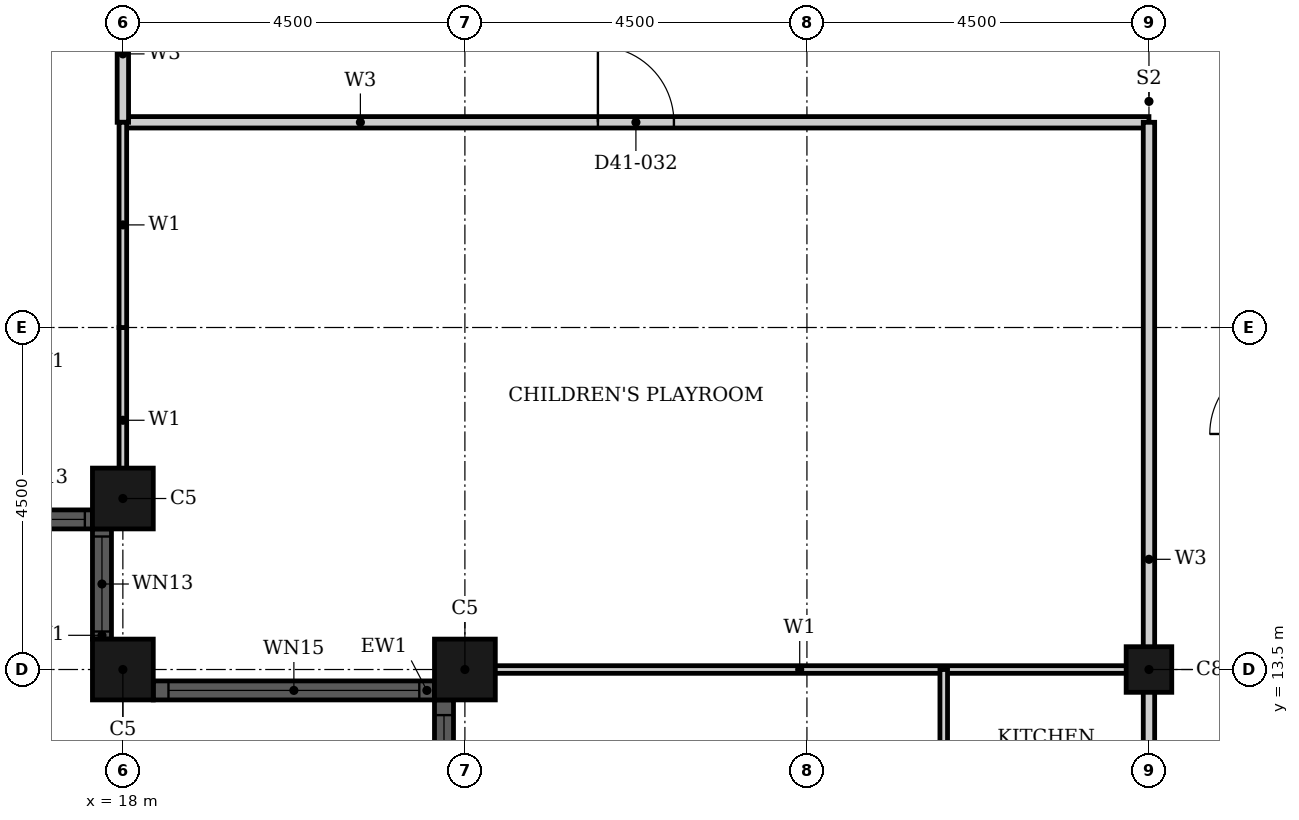
"""IFC4 building model, lengths in metres.
Left out: names, types, materials, properties, quantities, classifications, styles, units other than length and angle.
Written with IfcOpenShell. Run it as: python <this file> out.ifc"""

import sys

from ifc_helpers import new_model, si_unit, direction, frame, frame_2d, origin, origin_2d, place, context, subcontext, project, spatial, rectangle, hollow_rectangle, extrude, element, fill, save


model = new_model("IFC4")
c1 = context("Model", 3, precision=1e-05, world=origin(), true_north=direction((0.0, 1.0)))
c2 = subcontext(c1, "Body", "Model", "MODEL_VIEW")
j1 = project(units=[si_unit("LENGTHUNIT", "METRE"), si_unit("PLANEANGLEUNIT", "RADIAN")], contexts=[c1])
p1 = place(None, origin())
s1 = spatial("IfcSite", under=j1, at=p1, CompositionType="ELEMENT")
p2 = place(p1, origin())
s2 = spatial("IfcBuilding", under=s1, at=p2, CompositionType="ELEMENT")
p3 = place(p2, frame((0.0, 0.0, 165.4)))
s3 = spatial("IfcBuildingStorey", under=s2, at=p3, CompositionType="ELEMENT", Elevation=165.4)
for number, where, z_axis, x_axis in (
    (1, (18.0, 15.75, 0.0), (0.0, 0.0, 1.0), (1.0, 0.0, 0.0)),
    (2, (18.0, 13.5, 0.0), (0.0, 0.0, 1.0), (1.0, 0.0, 0.0)),
    (3, (22.5, 13.5, 0.0), (0.0, 0.0, 1.0), (1.0, 0.0, 0.0)),
):
    element("IfcColumn", number, at=place(p3, frame(where, z_axis=z_axis, x_axis=x_axis)), inside=s3, PredefinedType="COLUMN", context=c2, shape_type="SweptSolid", body=[
        extrude(hollow_rectangle(XDim=0.8, YDim=0.8, WallThickness=0.025, at=origin_2d()), origin(), (0.0, 0.0, 1.0), 3.7),
    ])
p4 = place(p3, frame((31.5, 13.5, 0.0), z_axis=(0.0, 0.0, 1.0), x_axis=(1.0, 0.0, 0.0)))
e4 = element("IfcColumn", 4, at=p4, inside=s3, PredefinedType="COLUMN", context=c2, shape_type="SweptSolid", body=[
    extrude(hollow_rectangle(XDim=0.6, YDim=0.6, WallThickness=0.02, at=origin_2d()), origin(), (0.0, 0.0, 1.0), 3.7),
])
p5 = place(p3, frame((16.15, 15.475, 0.0), z_axis=(0.0, 0.0, 1.0), x_axis=(1.0, 0.0, 0.0)))
e5 = element("IfcWall", 5, at=p5, inside=s3, PredefinedType="SOLIDWALL", context=c2, shape_type="SweptSolid", body=[
    extrude(rectangle(XDim=1.45, YDim=0.25, at=frame_2d((0.725, 0.0))), origin(), (0.0, 0.0, 1.0), 3.7),
])
p6 = place(p5, frame((0.1, 0.0, 0.9)))
e6 = element("IfcOpeningElement", 6, at=p6, cuts=e5, PredefinedType="OPENING", context=c2, shape_type="SweptSolid", body=[
    extrude(rectangle(XDim=1.25, YDim=1.85, at=frame_2d((0.625, 0.925))), frame((0.0, 0.135, 0.0), z_axis=(0.0, -1.0, 0.0), x_axis=(1.0, 0.0, 0.0)), (0.0, 0.0, 1.0), 0.27),
])
p7 = place(p3, frame((17.725, 15.35, 0.0), z_axis=(0.0, 0.0, 1.0), x_axis=(0.0, -1.0, 0.0)))
e7 = element("IfcWall", 7, at=p7, inside=s3, PredefinedType="SOLIDWALL", context=c2, shape_type="SweptSolid", body=[
    extrude(rectangle(XDim=1.45, YDim=0.25, at=frame_2d((0.725, 0.0))), origin(), (0.0, 0.0, 1.0), 3.7),
])
p8 = place(p7, frame((0.1, 0.0, 0.9)))
e8 = element("IfcOpeningElement", 8, at=p8, cuts=e7, PredefinedType="OPENING", context=c2, shape_type="SweptSolid", body=[
    extrude(rectangle(XDim=1.25, YDim=1.85, at=frame_2d((0.625, 0.925))), frame((0.0, 0.135, 0.0), z_axis=(0.0, -1.0, 0.0), x_axis=(1.0, 0.0, 0.0)), (0.0, 0.0, 1.0), 0.27),
])
p9 = place(p3, frame((18.4, 13.225, 0.0), z_axis=(0.0, 0.0, 1.0), x_axis=(1.0, 0.0, 0.0)))
e9 = element("IfcWall", 9, at=p9, inside=s3, PredefinedType="SOLIDWALL", context=c2, shape_type="SweptSolid", body=[
    extrude(rectangle(XDim=3.7, YDim=0.25, at=frame_2d((1.85, 0.0))), origin(), (0.0, 0.0, 1.0), 3.7),
])
p10 = place(p9, frame((0.2, 0.0, 0.45)))
e10 = element("IfcOpeningElement", 10, at=p10, cuts=e9, PredefinedType="OPENING", context=c2, shape_type="SweptSolid", body=[
    extrude(rectangle(XDim=3.3, YDim=2.3, at=frame_2d((1.65, 1.15))), frame((0.0, 0.135, 0.0), z_axis=(0.0, -1.0, 0.0), x_axis=(1.0, 0.0, 0.0)), (0.0, 0.0, 1.0), 0.27),
])
p11 = place(p3, frame((22.225, 13.1, 0.0), z_axis=(0.0, 0.0, 1.0), x_axis=(0.0, -1.0, 0.0)))
e11 = element("IfcWall", 11, at=p11, inside=s3, PredefinedType="SOLIDWALL", context=c2, shape_type="SweptSolid", body=[
    extrude(rectangle(XDim=8.2, YDim=0.25, at=frame_2d((4.1, 0.0))), origin(), (0.0, 0.0, 1.0), 3.7),
])
p12 = place(p11, frame((0.2, 0.0, 0.45)))
e12 = element("IfcOpeningElement", 12, at=p12, cuts=e11, PredefinedType="OPENING", context=c2, shape_type="SweptSolid", body=[
    extrude(rectangle(XDim=3.3, YDim=2.3, at=frame_2d((1.65, 1.15))), frame((0.0, 0.135, 0.0), z_axis=(0.0, -1.0, 0.0), x_axis=(1.0, 0.0, 0.0)), (0.0, 0.0, 1.0), 0.27),
])
p13 = place(p11, frame((4.7, 0.0, 0.45)))
e13 = element("IfcOpeningElement", 13, at=p13, cuts=e11, PredefinedType="OPENING", context=c2, shape_type="SweptSolid", body=[
    extrude(rectangle(XDim=3.3, YDim=2.3, at=frame_2d((1.65, 1.15))), frame((0.0, 0.135, 0.0), z_axis=(0.0, -1.0, 0.0), x_axis=(1.0, 0.0, 0.0)), (0.0, 0.0, 1.0), 0.27),
])
p14 = place(p3, frame((18.0, 20.7, 0.0), z_axis=(0.0, 0.0, 1.0), x_axis=(1.0, 0.0, 0.0)))
e14 = element("IfcWall", 14, at=p14, inside=s3, PredefinedType="PARTITIONING", context=c2, shape_type="SweptSolid", body=[
    extrude(rectangle(XDim=13.5, YDim=0.15, at=frame_2d((6.75, 0.0))), origin(), (0.0, 0.0, 1.0), 3.4),
])
p15 = place(p14, frame((6.25, 0.0, 0.0)))
e15 = element("IfcOpeningElement", 15, at=p15, cuts=e14, PredefinedType="OPENING", context=c2, shape_type="SweptSolid", body=[
    extrude(rectangle(XDim=1.0, YDim=2.1, at=frame_2d((0.5, 1.05))), frame((0.0, 0.085, 0.0), z_axis=(0.0, -1.0, 0.0), x_axis=(1.0, 0.0, 0.0)), (0.0, 0.0, 1.0), 0.17),
])
p16 = place(p3, frame((18.0, 20.7, 0.0), z_axis=(0.0, 0.0, 1.0), x_axis=(0.0, 1.0, 0.0)))
e16 = element("IfcWall", 16, at=p16, inside=s3, PredefinedType="PARTITIONING", context=c2, shape_type="SweptSolid", body=[
    extrude(rectangle(XDim=1.8, YDim=0.15, at=frame_2d((0.9, 0.0))), origin(), (0.0, 0.0, 1.0), 3.4),
])
p17 = place(p3, frame((31.5, 6.9, 0.0), z_axis=(0.0, 0.0, 1.0), x_axis=(0.0, 1.0, 0.0)))
e17 = element("IfcWall", 17, at=p17, inside=s3, PredefinedType="PARTITIONING", context=c2, shape_type="SweptSolid", body=[
    extrude(rectangle(XDim=13.8, YDim=0.15, at=frame_2d((6.9, 0.0))), origin(), (0.0, 0.0, 1.0), 2.68),
])
p18 = place(p17, frame((1.3, 0.0, 0.0)))
e18 = element("IfcOpeningElement", 18, at=p18, cuts=e17, PredefinedType="OPENING", context=c2, shape_type="SweptSolid", body=[
    extrude(rectangle(XDim=1.0, YDim=2.2, at=frame_2d((0.5, 1.1))), frame((0.0, 0.085, 0.0), z_axis=(0.0, -1.0, 0.0), x_axis=(1.0, 0.0, 0.0)), (0.0, 0.0, 1.0), 0.17),
])
p19 = place(p3, frame((22.31, 13.5, 0.0), z_axis=(0.0, 0.0, 1.0), x_axis=(1.0, 0.0, 0.0)))
e19 = element("IfcWall", 19, at=p19, inside=s3, PredefinedType="PARTITIONING", context=c2, shape_type="SweptSolid", body=[
    extrude(rectangle(XDim=9.19, YDim=0.1, at=frame_2d((4.595, 0.0))), origin(), (0.0, 0.0, 1.0), 2.48),
])
p20 = place(p3, frame((18.0, 15.56, 0.0), z_axis=(0.0, 0.0, 1.0), x_axis=(0.0, 1.0, 0.0)))
e20 = element("IfcWall", 20, at=p20, inside=s3, PredefinedType="PARTITIONING", context=c2, shape_type="SweptSolid", body=[
    extrude(rectangle(XDim=2.439, YDim=0.1, at=frame_2d((1.219, 0.0))), origin(), (0.0, 0.0, 1.0), 3.4),
])
p21 = place(p3, frame((18.0, 18.0, 0.0), z_axis=(0.0, 0.0, 1.0), x_axis=(0.0, 1.0, 0.0)))
e21 = element("IfcWall", 21, at=p21, inside=s3, PredefinedType="PARTITIONING", context=c2, shape_type="SweptSolid", body=[
    extrude(rectangle(XDim=2.7, YDim=0.1, at=frame_2d((1.35, 0.0))), origin(), (0.0, 0.0, 1.0), 3.4),
])
p22 = place(p3, frame((28.8, 10.5, 0.0), z_axis=(0.0, 0.0, 1.0), x_axis=(0.0, 1.0, 0.0)))
e22 = element("IfcWall", 22, at=p22, inside=s3, PredefinedType="PARTITIONING", context=c2, shape_type="SweptSolid", body=[
    extrude(rectangle(XDim=3.0, YDim=0.1, at=frame_2d((1.5, 0.0))), origin(), (0.0, 0.0, 1.0), 3.4),
])
p23 = place(p22, frame((1.05, 0.0, 0.0)))
e23 = element("IfcOpeningElement", 23, at=p23, cuts=e22, PredefinedType="OPENING", context=c2, shape_type="SweptSolid", body=[
    extrude(rectangle(XDim=0.9, YDim=2.1, at=frame_2d((0.45, 1.05))), frame((0.0, 0.06, 0.0), z_axis=(0.0, -1.0, 0.0), x_axis=(1.0, 0.0, 0.0)), (0.0, 0.0, 1.0), 0.12),
])
p24 = place(p6, origin())
e24 = element("IfcWindow", 24, at=p24, inside=s3, PartitioningType="SINGLE_PANEL", PredefinedType="WINDOW", context=c2, shape_type="SweptSolid", body=[
    extrude(rectangle(XDim=1.25, YDim=1.85, at=frame_2d((0.625, 0.925))), frame((0.0, 0.03, 0.0), z_axis=(0.0, -1.0, 0.0), x_axis=(1.0, 0.0, 0.0)), (0.0, 0.0, 1.0), 0.06),
])
fill(e6, e24)
p25 = place(p8, origin())
e25 = element("IfcWindow", 25, at=p25, inside=s3, PartitioningType="SINGLE_PANEL", PredefinedType="WINDOW", context=c2, shape_type="SweptSolid", body=[
    extrude(rectangle(XDim=1.25, YDim=1.85, at=frame_2d((0.625, 0.925))), frame((0.0, 0.03, 0.0), z_axis=(0.0, -1.0, 0.0), x_axis=(1.0, 0.0, 0.0)), (0.0, 0.0, 1.0), 0.06),
])
fill(e8, e25)
p26 = place(p10, origin())
e26 = element("IfcWindow", 26, at=p26, inside=s3, PartitioningType="SINGLE_PANEL", PredefinedType="WINDOW", context=c2, shape_type="SweptSolid", body=[
    extrude(rectangle(XDim=3.3, YDim=2.3, at=frame_2d((1.65, 1.15))), frame((0.0, 0.03, 0.0), z_axis=(0.0, -1.0, 0.0), x_axis=(1.0, 0.0, 0.0)), (0.0, 0.0, 1.0), 0.06),
])
fill(e10, e26)
p27 = place(p12, origin())
e27 = element("IfcWindow", 27, at=p27, inside=s3, PartitioningType="SINGLE_PANEL", PredefinedType="WINDOW", context=c2, shape_type="SweptSolid", body=[
    extrude(rectangle(XDim=3.3, YDim=2.3, at=frame_2d((1.65, 1.15))), frame((0.0, 0.03, 0.0), z_axis=(0.0, -1.0, 0.0), x_axis=(1.0, 0.0, 0.0)), (0.0, 0.0, 1.0), 0.06),
])
fill(e12, e27)
p28 = place(p15, origin())
e28 = element("IfcDoor", 28, at=p28, inside=s3, OperationType="SINGLE_SWING_LEFT", PredefinedType="DOOR", context=c2, shape_type="SweptSolid", body=[
    extrude(rectangle(XDim=1.0, YDim=2.1, at=frame_2d((0.5, 1.05))), frame((0.0, 0.025, 0.0), z_axis=(0.0, -1.0, 0.0), x_axis=(1.0, 0.0, 0.0)), (0.0, 0.0, 1.0), 0.05),
])
fill(e15, e28)
save(model, sys.argv[1])
